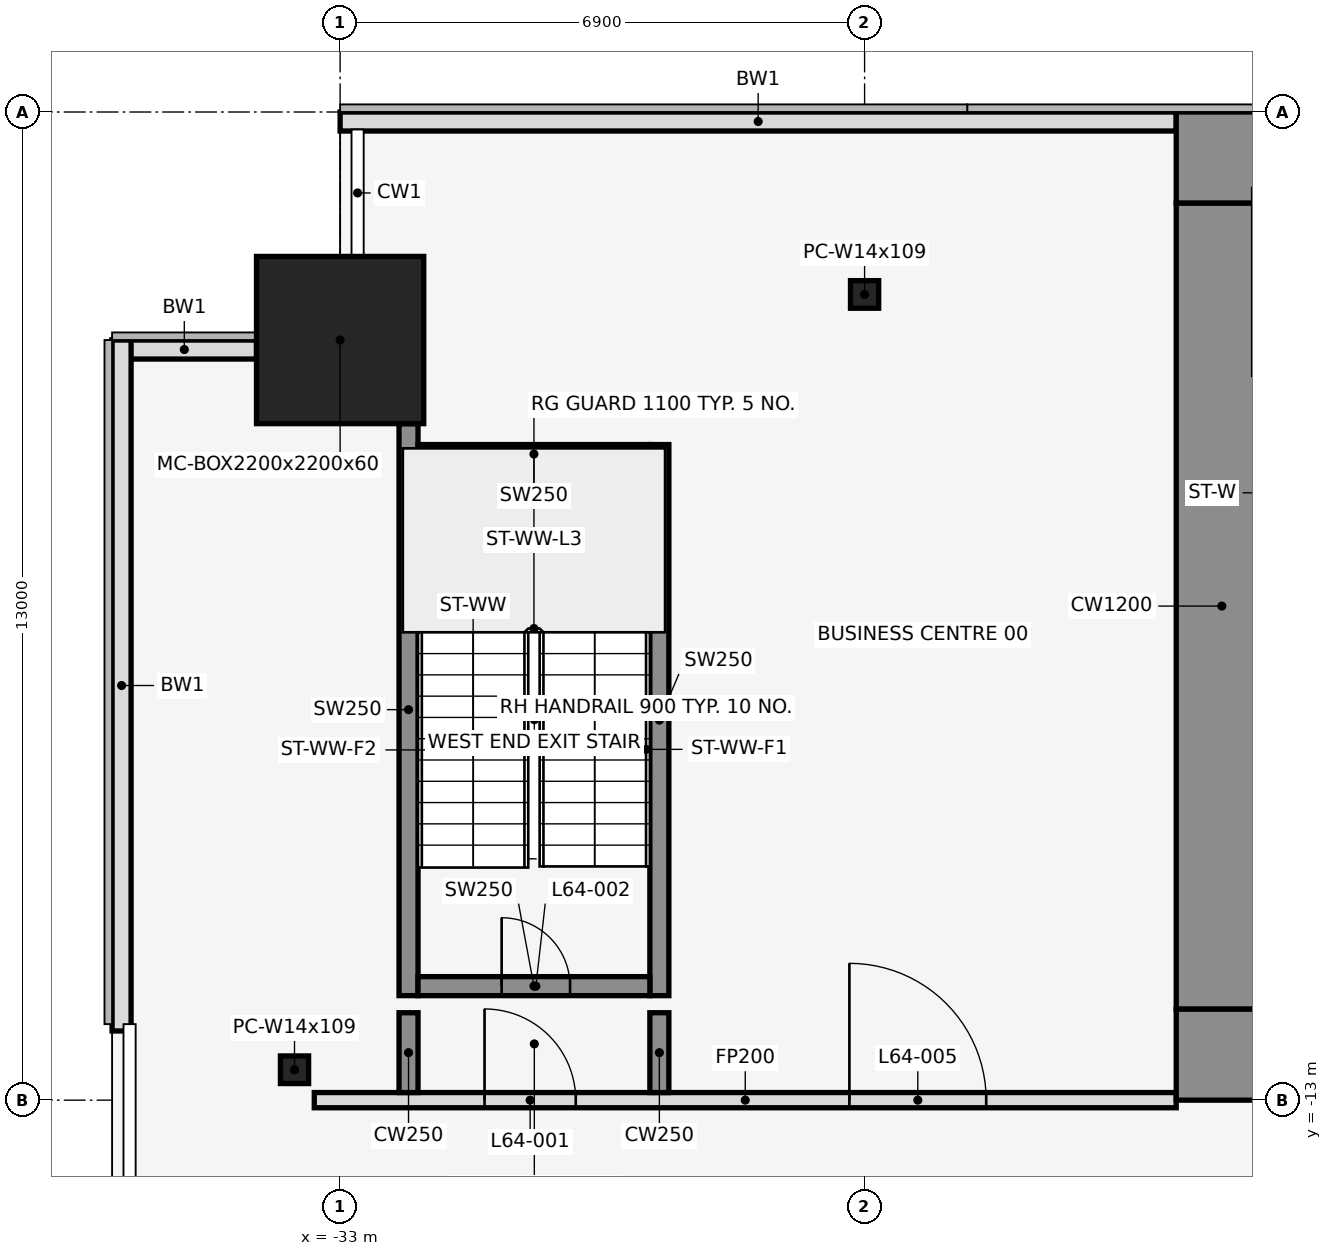
"""IFC4 building model, lengths in metres.
Left out: names, types, materials, properties, quantities, classifications, styles, units other than length and angle.
Written with IfcOpenShell. Run it as: python <this file> out.ifc"""

import sys

from ifc_helpers import new_model, si_unit, direction, frame, frame_2d, origin, origin_2d, place, context, subcontext, project, spatial, rectangle, hollow_rectangle, i_section, extrude, element, fill, save


model = new_model("IFC4")
c1 = context("Model", 3, precision=1e-05, world=origin(), true_north=direction((0.0, 1.0)))
c2 = subcontext(c1, "Body", "Model", "MODEL_VIEW")
j1 = project(units=[si_unit("LENGTHUNIT", "METRE"), si_unit("PLANEANGLEUNIT", "RADIAN")], contexts=[c1])
p1 = place(None, origin())
s1 = spatial("IfcSite", under=j1, at=p1, CompositionType="ELEMENT")
p2 = place(p1, origin())
s2 = spatial("IfcBuilding", under=s1, at=p2, CompositionType="ELEMENT")
p3 = place(p2, frame((0.0, 0.0, 283.4)))
s3 = spatial("IfcBuildingStorey", under=s2, at=p3, CompositionType="ELEMENT", Elevation=283.4)
p4 = place(p3, frame((-33.0, -3.0, 0.0), z_axis=(0.0, 0.0, 1.0), x_axis=(1.0, 0.0, 0.0)))
e1 = element("IfcColumn", 1, at=p4, inside=s3, PredefinedType="COLUMN", context=c2, shape_type="SweptSolid", body=[
    extrude(hollow_rectangle(XDim=2.2, YDim=2.2, WallThickness=0.06, at=origin_2d()), origin(), (0.0, 0.0, 1.0), 4.2),
])
for number, where, z_axis, x_axis in (
    (2, (-26.1, -2.4, 0.0), (0.0, 0.0, 1.0), (1.0, 0.0, 0.0)),
    (3, (-33.6, -12.6, 0.0), (0.0, 0.0, 1.0), (1.0, 0.0, 0.0)),
):
    element("IfcColumn", number, at=place(p3, frame(where, z_axis=z_axis, x_axis=x_axis)), inside=s3, PredefinedType="COLUMN", context=c2, shape_type="SweptSolid", body=[
        extrude(i_section(OverallWidth=0.371, OverallDepth=0.363, WebThickness=0.013, FlangeThickness=0.022, at=origin_2d()), origin(), (0.0, 0.0, 1.0), 4.2),
    ])
p5 = place(p3, frame((-22.0, -0.125, 0.0), z_axis=(0.0, 0.0, 1.0), x_axis=(-1.0, 0.0, 0.0)))
e4 = element("IfcWall", 4, at=p5, inside=s3, PredefinedType="STANDARD", context=c2, shape_type="SweptSolid", body=[
    extrude(rectangle(XDim=11.0, YDim=0.25, at=frame_2d((5.5, 0.0))), origin(), (0.0, 0.0, 1.0), 4.0),
])
p6 = place(p3, frame((-34.1, -3.125, 0.0), z_axis=(0.0, 0.0, 1.0), x_axis=(-1.0, 0.0, 0.0)))
e5 = element("IfcWall", 5, at=p6, inside=s3, PredefinedType="STANDARD", context=c2, shape_type="SweptSolid", body=[
    extrude(rectangle(XDim=1.9, YDim=0.25, at=frame_2d((0.95, 0.0))), origin(), (0.0, 0.0, 1.0), 4.0),
])
p7 = place(p3, frame((-35.875, -3.0, 0.0), z_axis=(0.0, 0.0, 1.0), x_axis=(0.0, -1.0, 0.0)))
e6 = element("IfcWall", 6, at=p7, inside=s3, PredefinedType="STANDARD", context=c2, shape_type="SweptSolid", body=[
    extrude(rectangle(XDim=9.09, YDim=0.25, at=frame_2d((4.545, 0.0))), origin(), (0.0, 0.0, 1.0), 4.0),
])
p8 = place(p3, frame((-32.1, -11.625, 0.0), z_axis=(0.0, 0.0, 1.0), x_axis=(0.0, 1.0, 0.0)))
e7 = element("IfcWall", 7, at=p8, inside=s3, PredefinedType="SHEAR", context=c2, shape_type="SweptSolid", body=[
    extrude(rectangle(XDim=7.525, YDim=0.25, at=frame_2d((3.762, 0.0))), origin(), (0.0, 0.0, 1.0), 4.2),
])
p9 = place(p3, frame((-28.8, -11.625, 0.0), z_axis=(0.0, 0.0, 1.0), x_axis=(0.0, 1.0, 0.0)))
e8 = element("IfcWall", 8, at=p9, inside=s3, PredefinedType="SHEAR", context=c2, shape_type="SweptSolid", body=[
    extrude(rectangle(XDim=7.25, YDim=0.25, at=frame_2d((3.625, 0.0))), origin(), (0.0, 0.0, 1.0), 4.2),
])
p10 = place(p3, frame((-31.975, -11.5, 0.0), z_axis=(0.0, 0.0, 1.0), x_axis=(1.0, 0.0, 0.0)))
e9 = element("IfcWall", 9, at=p10, inside=s3, PredefinedType="SHEAR", context=c2, shape_type="SweptSolid", body=[
    extrude(rectangle(XDim=3.05, YDim=0.25, at=frame_2d((1.525, 0.0))), origin(), (0.0, 0.0, 1.0), 4.2),
])
p11 = place(p10, frame((1.1, 0.0, 0.0)))
e10 = element("IfcOpeningElement", 10, at=p11, cuts=e9, PredefinedType="OPENING", context=c2, shape_type="SweptSolid", body=[
    extrude(rectangle(XDim=0.9, YDim=2.1, at=frame_2d((0.45, 1.05))), frame((0.0, 0.137, 0.0), z_axis=(0.0, -1.0, 0.0), x_axis=(1.0, 0.0, 0.0)), (0.0, 0.0, 1.0), 0.274),
])
p12 = place(p3, frame((-31.975, -4.5, 0.0), z_axis=(0.0, 0.0, 1.0), x_axis=(1.0, 0.0, 0.0)))
e11 = element("IfcWall", 11, at=p12, inside=s3, PredefinedType="SHEAR", context=c2, shape_type="SweptSolid", body=[
    extrude(rectangle(XDim=3.05, YDim=0.25, at=frame_2d((1.525, 0.0))), origin(), (0.0, 0.0, 1.0), 4.2),
])
p13 = place(p3, frame((-33.34, -13.0, 0.0), z_axis=(0.0, 0.0, 1.0), x_axis=(1.0, 0.0, 0.0)))
e12 = element("IfcWall", 12, at=p13, inside=s3, PredefinedType="PARTITIONING", context=c2, shape_type="SweptSolid", body=[
    extrude(rectangle(XDim=11.34, YDim=0.2, at=frame_2d((5.67, 0.0))), origin(), (0.0, 0.0, 1.0), 3.068),
])
p14 = place(p13, frame((2.24, 0.0, 0.0)))
e13 = element("IfcOpeningElement", 13, at=p14, cuts=e12, PredefinedType="OPENING", context=c2, shape_type="SweptSolid", body=[
    extrude(rectangle(XDim=1.2, YDim=2.1, at=frame_2d((0.6, 1.05))), frame((0.0, 0.112, 0.0), z_axis=(0.0, -1.0, 0.0), x_axis=(1.0, 0.0, 0.0)), (0.0, 0.0, 1.0), 0.224),
])
p15 = place(p13, frame((7.04, 0.0, 0.0)))
e14 = element("IfcOpeningElement", 14, at=p15, cuts=e12, PredefinedType="OPENING", context=c2, shape_type="SweptSolid", body=[
    extrude(rectangle(XDim=1.8, YDim=2.1, at=frame_2d((0.9, 1.05))), frame((0.0, 0.112, 0.0), z_axis=(0.0, -1.0, 0.0), x_axis=(1.0, 0.0, 0.0)), (0.0, 0.0, 1.0), 0.224),
])
for number, where, z_axis, x_axis in (
    (15, (-32.1, -12.9, 0.0), (0.0, 0.0, 1.0), (0.0, 1.0, 0.0)),
    (16, (-28.8, -12.9, 0.0), (0.0, 0.0, 1.0), (0.0, 1.0, 0.0)),
):
    element("IfcWall", number, at=place(p3, frame(where, z_axis=z_axis, x_axis=x_axis)), inside=s3, PredefinedType="SHEAR", context=c2, shape_type="SweptSolid", body=[
        extrude(rectangle(XDim=1.05, YDim=0.25, at=frame_2d((0.525, 0.0))), origin(), (0.0, 0.0, 1.0), 4.2),
    ])
p16 = place(p3, frame((-22.0, -0.6, 0.0), z_axis=(0.0, 0.0, 1.0), x_axis=(1.0, 0.0, 0.0)))
e17 = element("IfcWall", 17, at=p16, inside=s3, PredefinedType="SHEAR", context=c2, shape_type="SweptSolid", body=[
    extrude(rectangle(XDim=44.0, YDim=1.2, at=frame_2d((22.0, 0.0))), origin(), (0.0, 0.0, 1.0), 4.2),
])
p17 = place(p16, frame((18.55, 0.0, 0.0)))
e18 = element("IfcOpeningElement", 18, at=p17, cuts=e17, PredefinedType="OPENING", context=c2, shape_type="SweptSolid", body=[
    extrude(rectangle(XDim=0.9, YDim=2.1, at=frame_2d((0.45, 1.05))), frame((0.0, 0.612, 0.0), z_axis=(0.0, -1.0, 0.0), x_axis=(1.0, 0.0, 0.0)), (0.0, 0.0, 1.0), 1.224),
])
p18 = place(p16, frame((24.55, 0.0, 0.0)))
e19 = element("IfcOpeningElement", 19, at=p18, cuts=e17, PredefinedType="OPENING", context=c2, shape_type="SweptSolid", body=[
    extrude(rectangle(XDim=0.9, YDim=2.1, at=frame_2d((0.45, 1.05))), frame((0.0, 0.612, 0.0), z_axis=(0.0, -1.0, 0.0), x_axis=(1.0, 0.0, 0.0)), (0.0, 0.0, 1.0), 1.224),
])
p19 = place(p3, frame((-22.0, -12.4, 0.0), z_axis=(0.0, 0.0, 1.0), x_axis=(1.0, 0.0, 0.0)))
e20 = element("IfcWall", 20, at=p19, inside=s3, PredefinedType="SHEAR", context=c2, shape_type="SweptSolid", body=[
    extrude(rectangle(XDim=44.0, YDim=1.2, at=frame_2d((22.0, 0.0))), origin(), (0.0, 0.0, 1.0), 4.2),
])
p20 = place(p19, frame((2.2, 0.0, 0.0)))
e21 = element("IfcOpeningElement", 21, at=p20, cuts=e20, PredefinedType="OPENING", context=c2, shape_type="SweptSolid", body=[
    extrude(rectangle(XDim=1.2, YDim=2.1, at=frame_2d((0.6, 1.05))), frame((0.0, 0.612, 0.0), z_axis=(0.0, -1.0, 0.0), x_axis=(1.0, 0.0, 0.0)), (0.0, 0.0, 1.0), 1.224),
])
p21 = place(p19, frame((21.4, 0.0, 0.0)))
e22 = element("IfcOpeningElement", 22, at=p21, cuts=e20, PredefinedType="OPENING", context=c2, shape_type="SweptSolid", body=[
    extrude(rectangle(XDim=1.2, YDim=2.1, at=frame_2d((0.6, 1.05))), frame((0.0, 0.612, 0.0), z_axis=(0.0, -1.0, 0.0), x_axis=(1.0, 0.0, 0.0)), (0.0, 0.0, 1.0), 1.224),
])
p22 = place(p19, frame((40.6, 0.0, 0.0)))
e23 = element("IfcOpeningElement", 23, at=p22, cuts=e20, PredefinedType="OPENING", context=c2, shape_type="SweptSolid", body=[
    extrude(rectangle(XDim=1.2, YDim=2.1, at=frame_2d((0.6, 1.05))), frame((0.0, 0.612, 0.0), z_axis=(0.0, -1.0, 0.0), x_axis=(1.0, 0.0, 0.0)), (0.0, 0.0, 1.0), 1.224),
])
p23 = place(p19, frame((16.0, 0.0, 0.0)))
e24 = element("IfcOpeningElement", 24, at=p23, cuts=e20, PredefinedType="OPENING", context=c2, shape_type="SweptSolid", body=[
    extrude(rectangle(XDim=1.8, YDim=2.1, at=frame_2d((0.9, 1.05))), frame((0.0, 0.612, 0.0), z_axis=(0.0, -1.0, 0.0), x_axis=(1.0, 0.0, 0.0)), (0.0, 0.0, 1.0), 1.224),
])
p24 = place(p19, frame((6.3, 0.0, 0.0)))
e25 = element("IfcOpeningElement", 25, at=p24, cuts=e20, PredefinedType="OPENING", context=c2, shape_type="SweptSolid", body=[
    extrude(rectangle(XDim=1.2, YDim=2.1, at=frame_2d((0.6, 1.05))), frame((0.0, 0.612, 0.0), z_axis=(0.0, -1.0, 0.0), x_axis=(1.0, 0.0, 0.0)), (0.0, 0.0, 1.0), 1.224),
])
p25 = place(p19, frame((26.2, 0.0, 0.0)))
e26 = element("IfcOpeningElement", 26, at=p25, cuts=e20, PredefinedType="OPENING", context=c2, shape_type="SweptSolid", body=[
    extrude(rectangle(XDim=1.8, YDim=2.1, at=frame_2d((0.9, 1.05))), frame((0.0, 0.612, 0.0), z_axis=(0.0, -1.0, 0.0), x_axis=(1.0, 0.0, 0.0)), (0.0, 0.0, 1.0), 1.224),
])
p26 = place(p19, frame((36.5, 0.0, 0.0)))
e27 = element("IfcOpeningElement", 27, at=p26, cuts=e20, PredefinedType="OPENING", context=c2, shape_type="SweptSolid", body=[
    extrude(rectangle(XDim=1.2, YDim=2.1, at=frame_2d((0.6, 1.05))), frame((0.0, 0.612, 0.0), z_axis=(0.0, -1.0, 0.0), x_axis=(1.0, 0.0, 0.0)), (0.0, 0.0, 1.0), 1.224),
])
p27 = place(p3, frame((-21.4, -11.8, 0.0), z_axis=(0.0, 0.0, 1.0), x_axis=(0.0, 1.0, 0.0)))
e28 = element("IfcWall", 28, at=p27, inside=s3, PredefinedType="SHEAR", context=c2, shape_type="SweptSolid", body=[
    extrude(rectangle(XDim=10.6, YDim=1.2, at=frame_2d((5.3, 0.0))), origin(), (0.0, 0.0, 1.0), 4.2),
])
p28 = place(p14, origin())
e29 = element("IfcDoor", 29, at=p28, inside=s3, OperationType="SINGLE_SWING_LEFT", PredefinedType="DOOR", context=c2, shape_type="SweptSolid", body=[
    extrude(rectangle(XDim=1.2, YDim=2.1, at=frame_2d((0.6, 1.05))), frame((0.0, 0.025, 0.0), z_axis=(0.0, -1.0, 0.0), x_axis=(1.0, 0.0, 0.0)), (0.0, 0.0, 1.0), 0.05),
])
fill(e13, e29)
p29 = place(p11, origin())
e30 = element("IfcDoor", 30, at=p29, inside=s3, OperationType="SINGLE_SWING_LEFT", PredefinedType="DOOR", context=c2, shape_type="SweptSolid", body=[
    extrude(rectangle(XDim=0.9, YDim=2.1, at=frame_2d((0.45, 1.05))), frame((0.0, 0.025, 0.0), z_axis=(0.0, -1.0, 0.0), x_axis=(1.0, 0.0, 0.0)), (0.0, 0.0, 1.0), 0.05),
])
fill(e10, e30)
p30 = place(p15, origin())
e31 = element("IfcDoor", 31, at=p30, inside=s3, OperationType="SINGLE_SWING_LEFT", PredefinedType="DOOR", context=c2, shape_type="SweptSolid", body=[
    extrude(rectangle(XDim=1.8, YDim=2.1, at=frame_2d((0.9, 1.05))), frame((0.0, 0.025, 0.0), z_axis=(0.0, -1.0, 0.0), x_axis=(1.0, 0.0, 0.0)), (0.0, 0.0, 1.0), 0.05),
])
fill(e14, e31)
save(model, sys.argv[1])
